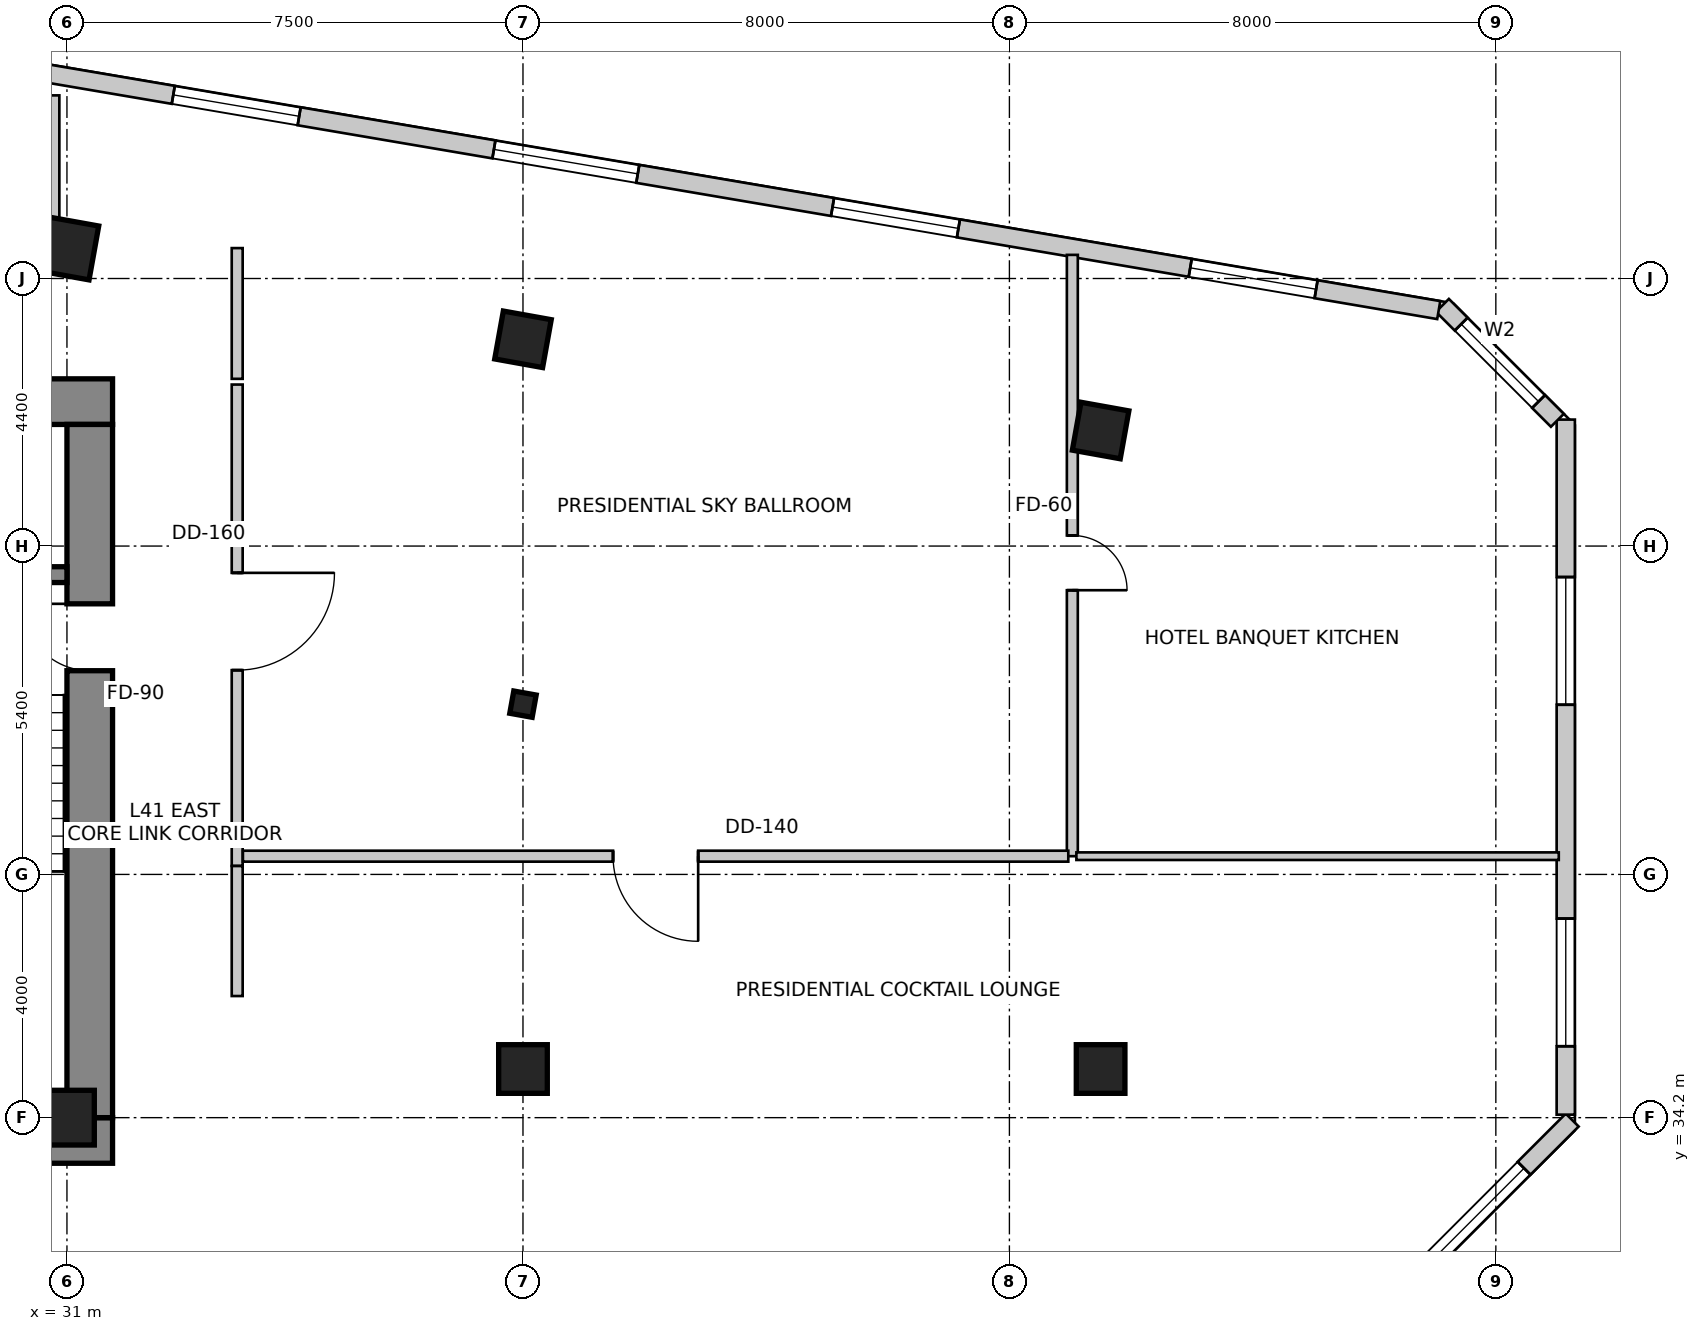
"""IFC4 building model, lengths in metres.
Left out: names, types, materials, properties, quantities, classifications, styles, units other than length and angle.
Written with IfcOpenShell. Run it as: python <this file> out.ifc"""

import sys

from ifc_helpers import new_model, si_unit, direction, frame, frame_2d, origin, origin_2d, place, context, subcontext, project, spatial, rectangle, i_section, extrude, source, transform, mapped, element, fill, save


model = new_model("IFC4")
c1 = context("Model", 3, precision=1e-05, world=origin(), true_north=direction((0.0, 1.0)))
c2 = subcontext(c1, "Body", "Model", "MODEL_VIEW")
j1 = project(units=[si_unit("LENGTHUNIT", "METRE"), si_unit("PLANEANGLEUNIT", "RADIAN")], contexts=[c1])
p1 = place(None, origin())
s1 = spatial("IfcSite", under=j1, at=p1, CompositionType="ELEMENT")
p2 = place(p1, origin())
s2 = spatial("IfcBuilding", under=s1, at=p2, CompositionType="ELEMENT")
p3 = place(p2, frame((0.0, 0.0, 164.6)))
s3 = spatial("IfcBuildingStorey", under=s2, at=p3, CompositionType="ELEMENT", Elevation=164.6)
p4 = place(p3, frame((15.85, 45.975, 0.0), z_axis=(0.0, 0.0, 1.0), x_axis=(1.0, 0.0, 0.0)))
e1 = element("IfcWall", 1, at=p4, inside=s3, PredefinedType="SHEAR", context=c2, shape_type="SweptSolid", body=[
    extrude(rectangle(XDim=15.9, YDim=0.75, at=frame_2d((7.95, 0.0))), origin(), (0.0, 0.0, 1.0), 3.6),
])
p5 = place(p3, frame((15.85, 33.825, 0.0), z_axis=(0.0, 0.0, 1.0), x_axis=(1.0, 0.0, 0.0)))
e2 = element("IfcWall", 2, at=p5, inside=s3, PredefinedType="SHEAR", context=c2, shape_type="SweptSolid", body=[
    extrude(rectangle(XDim=15.9, YDim=0.75, at=frame_2d((7.95, 0.0))), origin(), (0.0, 0.0, 1.0), 3.6),
])
m1 = source(origin(), c2, "Body", "SweptSolid", [
    extrude(rectangle(XDim=1.3, YDim=2.15, at=frame_2d((0.65, 1.075))), frame((0.0, 0.385, 0.0), z_axis=(0.0, -1.0, 0.0), x_axis=(1.0, 0.0, 0.0)), (0.0, 0.0, 1.0), 0.77),
])
p6 = place(p5, frame((10.08, 0.0, 0.0)))
e3 = element("IfcOpeningElement", 3, at=p6, cuts=e2, PredefinedType="OPENING", context=c2, shape_type="MappedRepresentation", body=[
    mapped(m1, transform((0.0, 0.0, 0.0), scale=1.0)),
])
p7 = place(p3, frame((31.375, 34.2, 0.0), z_axis=(0.0, 0.0, 1.0), x_axis=(0.0, 1.0, 0.0)))
e4 = element("IfcWall", 4, at=p7, inside=s3, PredefinedType="SHEAR", context=c2, shape_type="SweptSolid", body=[
    extrude(rectangle(XDim=11.4, YDim=0.75, at=frame_2d((5.7, 0.0))), origin(), (0.0, 0.0, 1.0), 3.6),
])
m2 = source(origin(), c2, "Body", "SweptSolid", [
    extrude(rectangle(XDim=1.1, YDim=2.15, at=frame_2d((0.55, 1.075))), frame((0.0, 0.385, 0.0), z_axis=(0.0, -1.0, 0.0), x_axis=(1.0, 0.0, 0.0)), (0.0, 0.0, 1.0), 0.77),
])
p8 = place(p7, frame((7.35, 0.0, 0.0)))
e5 = element("IfcOpeningElement", 5, at=p8, cuts=e4, PredefinedType="OPENING", context=c2, shape_type="MappedRepresentation", body=[
    mapped(m2, transform((0.0, 0.0, 0.0), scale=1.0)),
])
p9 = place(p3, frame((27.5, 43.13, 0.0), z_axis=(0.0, 0.0, 1.0), x_axis=(1.0, 0.0, 0.0)))
e6 = element("IfcWall", 6, at=p9, inside=s3, PredefinedType="SHEAR", context=c2, shape_type="SweptSolid", body=[
    extrude(rectangle(XDim=3.5, YDim=0.26, at=frame_2d((1.75, 0.0))), origin(), (0.0, 0.0, 1.0), 3.6),
])
m3 = source(origin(), c2, "Body", "SweptSolid", [
    extrude(rectangle(XDim=0.9, YDim=0.9, at=origin_2d()), origin(), (0.0, 0.0, 1.0), 3.6),
])
p10 = place(p3, frame((31.0, 48.5, 0.0), z_axis=(0.0, 0.0, 1.0), x_axis=(0.984195607969, -0.17708474032, 0.0)))
e7 = element("IfcColumn", 7, at=p10, inside=s3, PredefinedType="COLUMN", context=c2, shape_type="MappedRepresentation", body=[
    mapped(m3, transform((0.0, 0.0, 0.0), scale=1.0)),
])
m4 = source(origin(), c2, "Body", "SweptSolid", [
    extrude(rectangle(XDim=0.8, YDim=0.8, at=origin_2d()), origin(), (0.0, 0.0, 1.0), 3.6),
])
for number, where, z_axis, x_axis in (
    (8, (38.5, 47.0, 0.0), (0.0, 0.0, 1.0), (0.984, -0.177, 0.0)),
    (9, (48.0, 45.5, 0.0), (0.0, 0.0, 1.0), (0.984, -0.177, 0.0)),
):
    element("IfcColumn", number, at=place(p3, frame(where, z_axis=z_axis, x_axis=x_axis)), inside=s3, PredefinedType="COLUMN", context=c2, shape_type="MappedRepresentation", body=[
        mapped(m4, transform((0.0, 0.0, 0.0), scale=1.0)),
    ])
p11 = place(p3, frame((31.0, 34.2, 0.0), z_axis=(0.0, 0.0, 1.0), x_axis=(1.0, 0.0, 0.0)))
e10 = element("IfcColumn", 10, at=p11, inside=s3, PredefinedType="COLUMN", context=c2, shape_type="MappedRepresentation", body=[
    mapped(m3, transform((0.0, 0.0, 0.0), scale=1.0)),
])
for number, where, z_axis, x_axis in (
    (11, (38.5, 35.0, 0.0), (0.0, 0.0, 1.0), (1.0, 0.0, 0.0)),
    (12, (48.0, 35.0, 0.0), (0.0, 0.0, 1.0), (1.0, 0.0, 0.0)),
):
    element("IfcColumn", number, at=place(p3, frame(where, z_axis=z_axis, x_axis=x_axis)), inside=s3, PredefinedType="COLUMN", context=c2, shape_type="MappedRepresentation", body=[
        mapped(m4, transform((0.0, 0.0, 0.0), scale=1.0)),
    ])
m5 = source(origin(), c2, "Body", "SweptSolid", [
    extrude(i_section(OverallWidth=0.374, OverallDepth=0.372, WebThickness=0.016, FlangeThickness=0.026, FilletRadius=0.015, at=origin_2d()), origin(), (0.0, 0.0, 1.0), 3.6),
])
p12 = place(p3, frame((38.5, 41.0, 0.0), z_axis=(0.0, 0.0, 1.0), x_axis=(0.984195607969, -0.17708474032, 0.0)))
e13 = element("IfcColumn", 13, at=p12, inside=s3, PredefinedType="COLUMN", context=c2, shape_type="MappedRepresentation", body=[
    mapped(m5, transform((0.0, 0.0, 0.0), scale=1.0)),
])
p13 = place(p3, frame((52.476, 30.88, 0.0), z_axis=(0.0, 0.0, 1.0), x_axis=(0.707106781187, 0.707106781187, 0.0)))
e14 = element("IfcWall", 14, at=p13, inside=s3, PredefinedType="SOLIDWALL", context=c2, shape_type="SweptSolid", body=[
    extrude(rectangle(XDim=4.639, YDim=0.3, at=frame_2d((2.319, 0.0))), origin(), (0.0, 0.0, 1.0), 3.35),
])
m6 = source(origin(), c2, "Body", "SweptSolid", [
    extrude(rectangle(XDim=2.4, YDim=2.2, at=frame_2d((1.2, 1.1))), frame((0.0, 0.16, 0.0), z_axis=(0.0, -1.0, 0.0), x_axis=(1.0, 0.0, 0.0)), (0.0, 0.0, 1.0), 0.32),
])
p14 = place(p13, frame((1.119, 0.0, 0.85)))
e15 = element("IfcOpeningElement", 15, at=p14, cuts=e14, PredefinedType="OPENING", context=c2, shape_type="MappedRepresentation", body=[
    mapped(m6, transform((0.0, 0.0, 0.0), scale=1.0)),
])
p15 = place(p3, frame((55.65, 34.249, 0.0), z_axis=(0.0, 0.0, 1.0), x_axis=(0.0, 1.0, 0.0)))
e16 = element("IfcWall", 16, at=p15, inside=s3, PredefinedType="SOLIDWALL", context=c2, shape_type="SweptSolid", body=[
    extrude(rectangle(XDim=11.431, YDim=0.3, at=frame_2d((5.715, 0.0))), origin(), (0.0, 0.0, 1.0), 3.35),
])
m7 = source(origin(), c2, "Body", "SweptSolid", [
    extrude(rectangle(XDim=2.1, YDim=2.0, at=frame_2d((1.05, 1.0))), frame((0.0, 0.16, 0.0), z_axis=(0.0, -1.0, 0.0), x_axis=(1.0, 0.0, 0.0)), (0.0, 0.0, 1.0), 0.32),
])
p16 = place(p15, frame((1.125, 0.0, 0.85)))
e17 = element("IfcOpeningElement", 17, at=p16, cuts=e16, PredefinedType="OPENING", context=c2, shape_type="MappedRepresentation", body=[
    mapped(m7, transform((0.0, 0.0, 0.0), scale=1.0)),
])
p17 = place(p15, frame((6.741, 0.0, 0.85)))
e18 = element("IfcOpeningElement", 18, at=p17, cuts=e16, PredefinedType="OPENING", context=c2, shape_type="MappedRepresentation", body=[
    mapped(m7, transform((0.0, 0.0, 0.0), scale=1.0)),
])
p18 = place(p3, frame((55.512, 45.668, 0.0), z_axis=(0.0, 0.0, 1.0), x_axis=(-0.707152443695, 0.707061115729, 0.0)))
e19 = element("IfcWall", 19, at=p18, inside=s3, PredefinedType="SOLIDWALL", context=c2, shape_type="SweptSolid", body=[
    extrude(rectangle(XDim=2.673, YDim=0.3, at=frame_2d((1.337, 0.0))), origin(), (0.0, 0.0, 1.0), 3.35),
])
m8 = source(origin(), c2, "Body", "SweptSolid", [
    extrude(rectangle(XDim=1.8, YDim=2.1, at=frame_2d((0.9, 1.05))), frame((0.0, 0.16, 0.0), z_axis=(0.0, -1.0, 0.0), x_axis=(1.0, 0.0, 0.0)), (0.0, 0.0, 1.0), 0.32),
])
p19 = place(p18, frame((0.437, 0.0, 0.85)))
e20 = element("IfcOpeningElement", 20, at=p19, cuts=e19, PredefinedType="OPENING", context=c2, shape_type="MappedRepresentation", body=[
    mapped(m8, transform((0.0, 0.0, 0.0), scale=1.0)),
])
p20 = place(p3, frame((53.561, 47.48, 0.0), z_axis=(0.0, 0.0, 1.0), x_axis=(-0.985845173895, 0.167658262868, 0.0)))
e21 = element("IfcWall", 21, at=p20, inside=s3, PredefinedType="SOLIDWALL", context=c2, shape_type="SweptSolid", body=[
    extrude(rectangle(XDim=32.132, YDim=0.3, at=frame_2d((16.066, 0.0))), origin(), (0.0, 0.0, 1.0), 3.35),
])
p21 = place(p20, frame((2.046, 0.0, 0.85)))
e22 = element("IfcOpeningElement", 22, at=p21, cuts=e21, PredefinedType="OPENING", context=c2, shape_type="MappedRepresentation", body=[
    mapped(m7, transform((0.0, 0.0, 0.0), scale=1.0)),
])
p22 = place(p20, frame((8.013, 0.0, 0.85)))
e23 = element("IfcOpeningElement", 23, at=p22, cuts=e21, PredefinedType="OPENING", context=c2, shape_type="MappedRepresentation", body=[
    mapped(m7, transform((0.0, 0.0, 0.0), scale=1.0)),
])
p23 = place(p20, frame((13.362, 0.0, 0.85)))
e24 = element("IfcOpeningElement", 24, at=p23, cuts=e21, PredefinedType="OPENING", context=c2, shape_type="MappedRepresentation", body=[
    mapped(m6, transform((0.0, 0.0, 0.0), scale=1.0)),
])
p24 = place(p20, frame((19.011, 0.0, 0.85)))
e25 = element("IfcOpeningElement", 25, at=p24, cuts=e21, PredefinedType="OPENING", context=c2, shape_type="MappedRepresentation", body=[
    mapped(m7, transform((0.0, 0.0, 0.0), scale=1.0)),
])
p25 = place(p20, frame((25.55, 0.0, 0.85)))
e26 = element("IfcOpeningElement", 26, at=p25, cuts=e21, PredefinedType="OPENING", context=c2, shape_type="MappedRepresentation", body=[
    mapped(m7, transform((0.0, 0.0, 0.0), scale=1.0)),
])
m9 = source(origin(), c2, "Body", "SweptSolid", [
    extrude(rectangle(XDim=0.9, YDim=1.6, at=frame_2d((0.45, 0.8))), frame((0.0, 0.16, 0.0), z_axis=(0.0, -1.0, 0.0), x_axis=(1.0, 0.0, 0.0)), (0.0, 0.0, 1.0), 0.32),
])
p26 = place(p20, frame((30.65, 0.0, 0.85)))
e27 = element("IfcOpeningElement", 27, at=p26, cuts=e21, PredefinedType="OPENING", context=c2, shape_type="MappedRepresentation", body=[
    mapped(m9, transform((0.0, 0.0, 0.0), scale=1.0)),
])
p27 = place(p3, frame((23.962, 48.5, 0.0), z_axis=(0.0, 0.0, 1.0), x_axis=(1.0, 0.0, 0.0)))
e28 = element("IfcWall", 28, at=p27, inside=s3, PredefinedType="PARTITIONING", context=c2, shape_type="SweptSolid", body=[
    extrude(rectangle(XDim=6.998, YDim=0.18, at=frame_2d((3.499, 0.0))), origin(), (0.0, 0.0, 1.0), 2.492),
])
m10 = source(origin(), c2, "Body", "SweptSolid", [
    extrude(rectangle(XDim=0.85, YDim=2.15, at=frame_2d((0.425, 1.075))), frame((0.0, 0.1, 0.0), z_axis=(0.0, -1.0, 0.0), x_axis=(1.0, 0.0, 0.0)), (0.0, 0.0, 1.0), 0.2),
])
p28 = place(p27, frame((3.074, 0.0, 0.0)))
e29 = element("IfcOpeningElement", 29, at=p28, cuts=e28, PredefinedType="OPENING", context=c2, shape_type="MappedRepresentation", body=[
    mapped(m10, transform((0.0, 0.0, 0.0), scale=1.0)),
])
p29 = place(p3, frame((33.8, 48.5, 0.0), z_axis=(0.0, 0.0, 1.0), x_axis=(0.0, -1.0, 0.0)))
e30 = element("IfcWall", 30, at=p29, inside=s3, PredefinedType="PARTITIONING", context=c2, shape_type="SweptSolid", body=[
    extrude(rectangle(XDim=2.15, YDim=0.18, at=frame_2d((1.075, 0.0))), origin(), (0.0, 0.0, 1.0), 2.492),
])
p30 = place(p3, frame((33.8, 46.256, 0.0), z_axis=(0.0, 0.0, 1.0), x_axis=(0.0, -1.0, 0.0)))
e31 = element("IfcWall", 31, at=p30, inside=s3, PredefinedType="PARTITIONING", context=c2, shape_type="SweptSolid", body=[
    extrude(rectangle(XDim=7.916, YDim=0.18, at=frame_2d((3.958, 0.0))), origin(), (0.0, 0.0, 1.0), 2.922),
])
m11 = source(origin(), c2, "Body", "SweptSolid", [
    extrude(rectangle(XDim=1.6, YDim=2.15, at=frame_2d((0.8, 1.075))), frame((0.0, 0.1, 0.0), z_axis=(0.0, -1.0, 0.0), x_axis=(1.0, 0.0, 0.0)), (0.0, 0.0, 1.0), 0.2),
])
p31 = place(p30, frame((3.097, 0.0, 0.0)))
e32 = element("IfcOpeningElement", 32, at=p31, cuts=e31, PredefinedType="OPENING", context=c2, shape_type="MappedRepresentation", body=[
    mapped(m11, transform((0.0, 0.0, 0.0), scale=1.0)),
])
p32 = place(p3, frame((33.8, 38.338, 0.0), z_axis=(0.0, 0.0, 1.0), x_axis=(0.0, -1.0, 0.0)))
e33 = element("IfcWall", 33, at=p32, inside=s3, PredefinedType="PARTITIONING", context=c2, shape_type="SweptSolid", body=[
    extrude(rectangle(XDim=2.138, YDim=0.18, at=frame_2d((1.069, 0.0))), origin(), (0.0, 0.0, 1.0), 3.35),
])
p33 = place(p3, frame((47.535, 48.389, 0.0), z_axis=(0.0, 0.0, 1.0), x_axis=(0.0, -1.0, 0.0)))
e34 = element("IfcWall", 34, at=p33, inside=s3, PredefinedType="PARTITIONING", context=c2, shape_type="SweptSolid", body=[
    extrude(rectangle(XDim=9.889, YDim=0.18, at=frame_2d((4.944, 0.0))), origin(), (0.0, 0.0, 1.0), 2.492),
])
m12 = source(origin(), c2, "Body", "SweptSolid", [
    extrude(rectangle(XDim=0.9, YDim=2.15, at=frame_2d((0.45, 1.075))), frame((0.0, 0.1, 0.0), z_axis=(0.0, -1.0, 0.0), x_axis=(1.0, 0.0, 0.0)), (0.0, 0.0, 1.0), 0.2),
])
p34 = place(p33, frame((4.615, 0.0, 0.0)))
e35 = element("IfcOpeningElement", 35, at=p34, cuts=e34, PredefinedType="OPENING", context=c2, shape_type="MappedRepresentation", body=[
    mapped(m12, transform((0.0, 0.0, 0.0), scale=1.0)),
])
p35 = place(p3, frame((47.469, 38.5, 0.0), z_axis=(0.0, 0.0, 1.0), x_axis=(-1.0, 0.0, 0.0)))
e36 = element("IfcWall", 36, at=p35, inside=s3, PredefinedType="PARTITIONING", context=c2, shape_type="SweptSolid", body=[
    extrude(rectangle(XDim=13.574, YDim=0.18, at=frame_2d((6.787, 0.0))), origin(), (0.0, 0.0, 1.0), 2.803),
])
m13 = source(origin(), c2, "Body", "SweptSolid", [
    extrude(rectangle(XDim=1.4, YDim=2.15, at=frame_2d((0.7, 1.075))), frame((0.0, 0.1, 0.0), z_axis=(0.0, -1.0, 0.0), x_axis=(1.0, 0.0, 0.0)), (0.0, 0.0, 1.0), 0.2),
])
p36 = place(p35, frame((6.087, 0.0, 0.0)))
e37 = element("IfcOpeningElement", 37, at=p36, cuts=e36, PredefinedType="OPENING", context=c2, shape_type="MappedRepresentation", body=[
    mapped(m13, transform((0.0, 0.0, 0.0), scale=1.0)),
])
p37 = place(p3, frame((55.535, 38.5, 0.0), z_axis=(0.0, 0.0, 1.0), x_axis=(-1.0, 0.0, 0.0)))
e38 = element("IfcWall", 38, at=p37, inside=s3, PredefinedType="PARTITIONING", context=c2, shape_type="SweptSolid", body=[
    extrude(rectangle(XDim=7.933, YDim=0.125, at=frame_2d((3.967, 0.0))), origin(), (0.0, 0.0, 1.0), 2.803),
])
p38 = place(p3, frame((30.8, 51.011, 0.0), z_axis=(0.0, 0.0, 1.0), x_axis=(0.0, -1.0, 0.0)))
e39 = element("IfcWall", 39, at=p38, inside=s3, PredefinedType="PARTITIONING", context=c2, shape_type="SweptSolid", body=[
    extrude(rectangle(XDim=2.292, YDim=0.15, at=frame_2d((1.146, 0.0))), origin(), (0.0, 0.0, 1.0), 3.35),
])
m14 = source(origin(), c2, "Body", "SweptSolid", [
    extrude(rectangle(XDim=2.4, YDim=2.2, at=frame_2d((1.2, 1.1))), frame((0.0, -0.015, 0.0), z_axis=(0.0, -1.0, 0.0), x_axis=(1.0, 0.0, 0.0)), (0.0, 0.0, 1.0), 0.06),
])
p39 = place(p14, origin())
e40 = element("IfcWindow", 40, at=p39, inside=s3, PartitioningType="SINGLE_PANEL", PredefinedType="WINDOW", context=c2, shape_type="MappedRepresentation", body=[
    mapped(m14, transform((0.0, 0.0, 0.0), scale=1.0)),
])
fill(e15, e40)
m15 = source(origin(), c2, "Body", "SweptSolid", [
    extrude(rectangle(XDim=2.1, YDim=2.0, at=frame_2d((1.05, 1.0))), frame((0.0, -0.015, 0.0), z_axis=(0.0, -1.0, 0.0), x_axis=(1.0, 0.0, 0.0)), (0.0, 0.0, 1.0), 0.06),
])
p40 = place(p16, origin())
e41 = element("IfcWindow", 41, at=p40, inside=s3, PartitioningType="SINGLE_PANEL", PredefinedType="WINDOW", context=c2, shape_type="MappedRepresentation", body=[
    mapped(m15, transform((0.0, 0.0, 0.0), scale=1.0)),
])
fill(e17, e41)
p41 = place(p17, origin())
e42 = element("IfcWindow", 42, at=p41, inside=s3, PartitioningType="SINGLE_PANEL", PredefinedType="WINDOW", context=c2, shape_type="MappedRepresentation", body=[
    mapped(m15, transform((0.0, 0.0, 0.0), scale=1.0)),
])
fill(e18, e42)
m16 = source(origin(), c2, "Body", "SweptSolid", [
    extrude(rectangle(XDim=1.8, YDim=2.1, at=frame_2d((0.9, 1.05))), frame((0.0, -0.015, 0.0), z_axis=(0.0, -1.0, 0.0), x_axis=(1.0, 0.0, 0.0)), (0.0, 0.0, 1.0), 0.06),
])
p42 = place(p19, origin())
e43 = element("IfcWindow", 43, at=p42, inside=s3, PartitioningType="SINGLE_PANEL", PredefinedType="WINDOW", context=c2, shape_type="MappedRepresentation", body=[
    mapped(m16, transform((0.0, 0.0, 0.0), scale=1.0)),
])
fill(e20, e43)
p43 = place(p21, origin())
e44 = element("IfcWindow", 44, at=p43, inside=s3, PartitioningType="SINGLE_PANEL", PredefinedType="WINDOW", context=c2, shape_type="MappedRepresentation", body=[
    mapped(m15, transform((0.0, 0.0, 0.0), scale=1.0)),
])
fill(e22, e44)
p44 = place(p22, origin())
e45 = element("IfcWindow", 45, at=p44, inside=s3, PartitioningType="SINGLE_PANEL", PredefinedType="WINDOW", context=c2, shape_type="MappedRepresentation", body=[
    mapped(m15, transform((0.0, 0.0, 0.0), scale=1.0)),
])
fill(e23, e45)
p45 = place(p23, origin())
e46 = element("IfcWindow", 46, at=p45, inside=s3, PartitioningType="SINGLE_PANEL", PredefinedType="WINDOW", context=c2, shape_type="MappedRepresentation", body=[
    mapped(m14, transform((0.0, 0.0, 0.0), scale=1.0)),
])
fill(e24, e46)
p46 = place(p24, origin())
e47 = element("IfcWindow", 47, at=p46, inside=s3, PartitioningType="SINGLE_PANEL", PredefinedType="WINDOW", context=c2, shape_type="MappedRepresentation", body=[
    mapped(m15, transform((0.0, 0.0, 0.0), scale=1.0)),
])
fill(e25, e47)
m17 = source(origin(), c2, "Body", "SweptSolid", [
    extrude(rectangle(XDim=1.1, YDim=2.15, at=frame_2d((0.55, 1.075))), frame((0.0, 0.025, 0.0), z_axis=(0.0, -1.0, 0.0), x_axis=(1.0, 0.0, 0.0)), (0.0, 0.0, 1.0), 0.05),
])
p47 = place(p8, origin())
e48 = element("IfcDoor", 48, at=p47, inside=s3, OperationType="SINGLE_SWING_RIGHT", PredefinedType="DOOR", context=c2, shape_type="MappedRepresentation", body=[
    mapped(m17, transform((0.0, 0.0, 0.0), scale=1.0)),
])
fill(e5, e48)
m18 = source(origin(), c2, "Body", "SweptSolid", [
    extrude(rectangle(XDim=1.6, YDim=2.15, at=frame_2d((0.8, 1.075))), frame((0.0, 0.025, 0.0), z_axis=(0.0, -1.0, 0.0), x_axis=(1.0, 0.0, 0.0)), (0.0, 0.0, 1.0), 0.05),
])
p48 = place(p31, origin())
e49 = element("IfcDoor", 49, at=p48, inside=s3, OperationType="SINGLE_SWING_LEFT", PredefinedType="DOOR", context=c2, shape_type="MappedRepresentation", body=[
    mapped(m18, transform((0.0, 0.0, 0.0), scale=1.0)),
])
fill(e32, e49)
m19 = source(origin(), c2, "Body", "SweptSolid", [
    extrude(rectangle(XDim=0.9, YDim=2.15, at=frame_2d((0.45, 1.075))), frame((0.0, 0.025, 0.0), z_axis=(0.0, -1.0, 0.0), x_axis=(1.0, 0.0, 0.0)), (0.0, 0.0, 1.0), 0.05),
])
p49 = place(p34, origin())
e50 = element("IfcDoor", 50, at=p49, inside=s3, OperationType="SINGLE_SWING_RIGHT", PredefinedType="DOOR", context=c2, shape_type="MappedRepresentation", body=[
    mapped(m19, transform((0.0, 0.0, 0.0), scale=1.0)),
])
fill(e35, e50)
m20 = source(origin(), c2, "Body", "SweptSolid", [
    extrude(rectangle(XDim=1.4, YDim=2.15, at=frame_2d((0.7, 1.075))), frame((0.0, 0.025, 0.0), z_axis=(0.0, -1.0, 0.0), x_axis=(1.0, 0.0, 0.0)), (0.0, 0.0, 1.0), 0.05),
])
p50 = place(p36, origin())
e51 = element("IfcDoor", 51, at=p50, inside=s3, OperationType="SINGLE_SWING_LEFT", PredefinedType="DOOR", context=c2, shape_type="MappedRepresentation", body=[
    mapped(m20, transform((0.0, 0.0, 0.0), scale=1.0)),
])
fill(e37, e51)
save(model, sys.argv[1])
